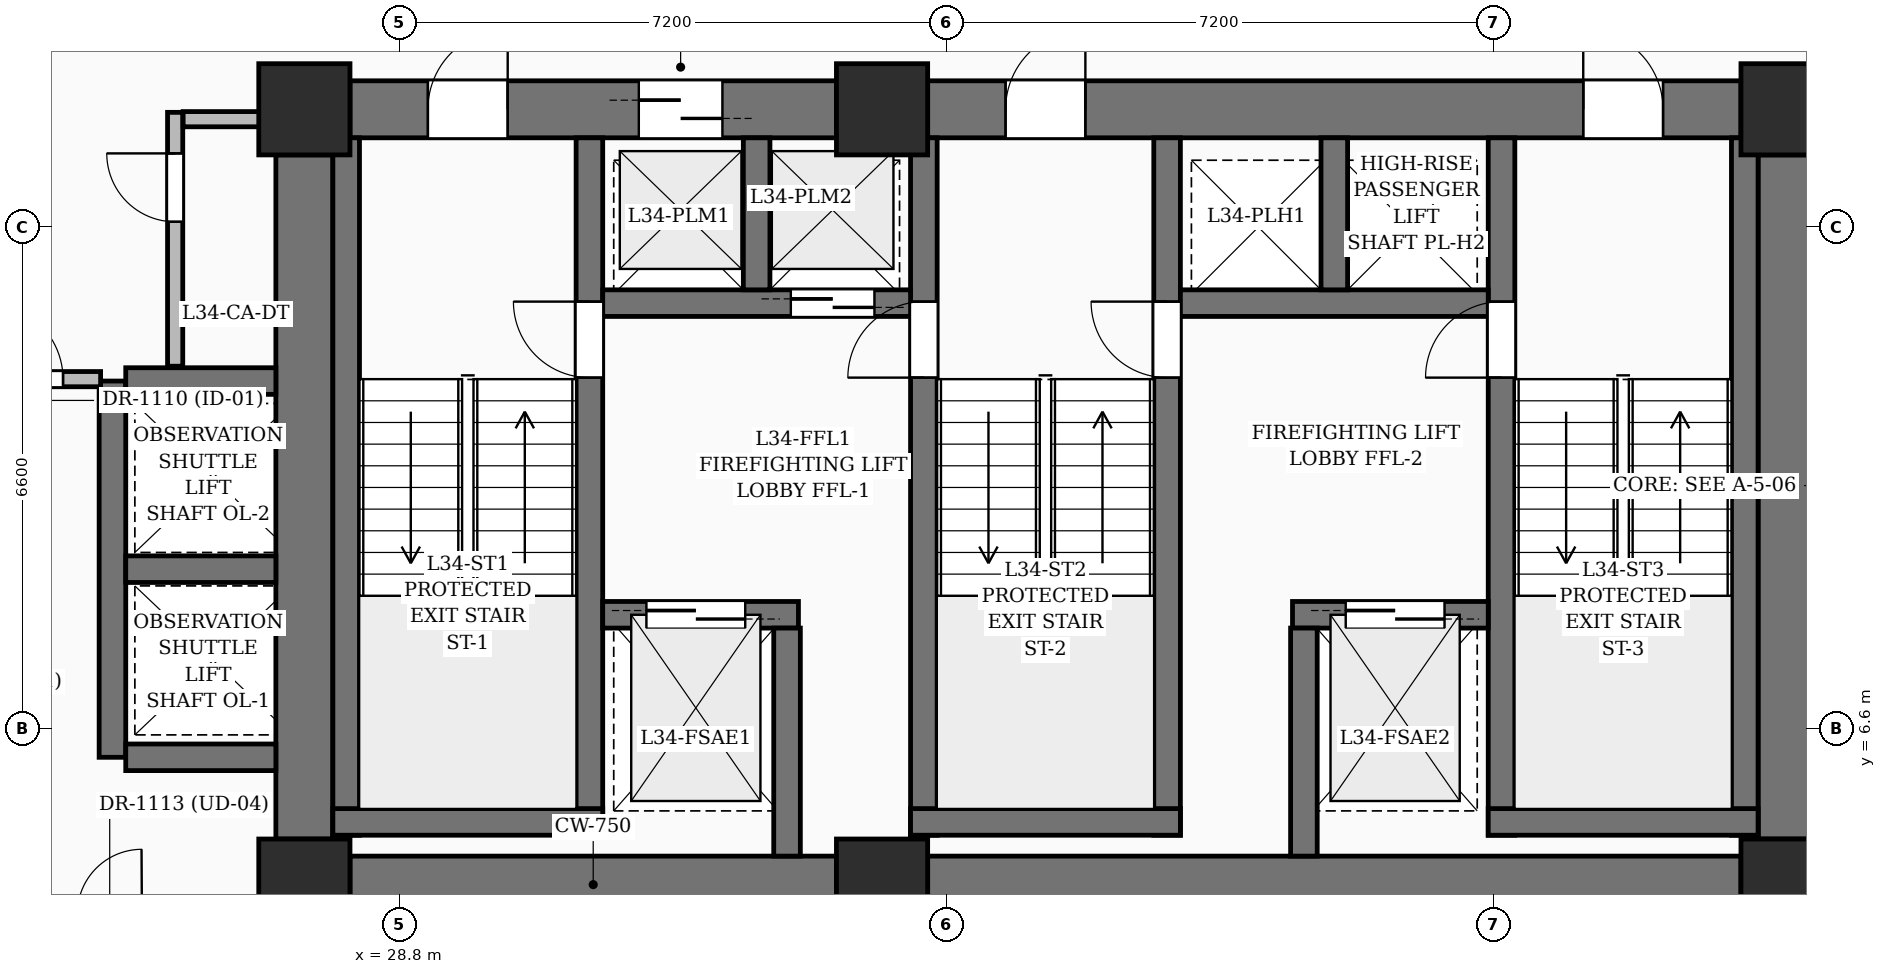
"""IFC4 building model, lengths in metres.
Left out: names, types, materials, properties, quantities, classifications, styles, units other than length and angle.
Written with IfcOpenShell. Run it as: python <this file> out.ifc"""

import sys

from ifc_helpers import new_model, si_unit, direction, frame, frame_2d, origin, origin_2d, place, context, subcontext, project, spatial, rectangle, extrude, element, fill, save


model = new_model("IFC4")
c1 = context("Model", 3, precision=1e-05, world=origin(), true_north=direction((0.0, 1.0)))
c2 = subcontext(c1, "Body", "Model", "MODEL_VIEW")
j1 = project(units=[si_unit("LENGTHUNIT", "METRE"), si_unit("PLANEANGLEUNIT", "RADIAN")], contexts=[c1])
p1 = place(None, origin())
s1 = spatial("IfcSite", under=j1, at=p1, CompositionType="ELEMENT")
p2 = place(p1, origin())
s2 = spatial("IfcBuilding", under=s1, at=p2, CompositionType="ELEMENT")
p3 = place(p2, frame((0.0, 0.0, 135.6)))
s3 = spatial("IfcBuildingStorey", under=s2, at=p3, CompositionType="ELEMENT", Elevation=135.6)
for number, where, z_axis, x_axis in (
    (1, (27.55, 4.55, 0.0), (0.0, 0.0, 1.0), (1.0, 0.0, 0.0)),
    (2, (35.15, 4.55, 0.0), (0.0, 0.0, 1.0), (1.0, 0.0, 0.0)),
    (3, (47.05, 4.55, 0.0), (0.0, 0.0, 1.0), (1.0, 0.0, 0.0)),
    (4, (27.55, 14.75, 0.0), (0.0, 0.0, 1.0), (1.0, 0.0, 0.0)),
    (5, (35.15, 14.75, 0.0), (0.0, 0.0, 1.0), (1.0, 0.0, 0.0)),
    (6, (47.05, 14.75, 0.0), (0.0, 0.0, 1.0), (1.0, 0.0, 0.0)),
):
    element("IfcColumn", number, at=place(p3, frame(where, z_axis=z_axis, x_axis=x_axis)), inside=s3, PredefinedType="COLUMN", context=c2, shape_type="SweptSolid", body=[
        extrude(rectangle(XDim=1.2, YDim=1.2, at=origin_2d()), origin(), (0.0, 0.0, 1.0), 3.6),
    ])
p4 = place(p3, frame((28.15, 4.55, 0.0), z_axis=(0.0, 0.0, 1.0), x_axis=(1.0, 0.0, 0.0)))
e7 = element("IfcWall", 7, at=p4, inside=s3, PredefinedType="SHEAR", context=c2, shape_type="SweptSolid", body=[
    extrude(rectangle(XDim=6.4, YDim=0.75, at=frame_2d((3.2, 0.0))), origin(), (0.0, 0.0, 1.0), 3.6),
])
p5 = place(p3, frame((35.75, 4.55, 0.0), z_axis=(0.0, 0.0, 1.0), x_axis=(1.0, 0.0, 0.0)))
e8 = element("IfcWall", 8, at=p5, inside=s3, PredefinedType="SHEAR", context=c2, shape_type="SweptSolid", body=[
    extrude(rectangle(XDim=10.7, YDim=0.75, at=frame_2d((5.35, 0.0))), origin(), (0.0, 0.0, 1.0), 3.6),
])
p6 = place(p3, frame((28.15, 14.75, 0.0), z_axis=(0.0, 0.0, 1.0), x_axis=(1.0, 0.0, 0.0)))
e9 = element("IfcWall", 9, at=p6, inside=s3, PredefinedType="SHEAR", context=c2, shape_type="SweptSolid", body=[
    extrude(rectangle(XDim=6.4, YDim=0.75, at=frame_2d((3.2, 0.0))), origin(), (0.0, 0.0, 1.0), 3.6),
])
p7 = place(p6, frame((1.025, 0.0, 0.0)))
e10 = element("IfcOpeningElement", 10, at=p7, cuts=e9, PredefinedType="OPENING", context=c2, shape_type="SweptSolid", body=[
    extrude(rectangle(XDim=1.05, YDim=2.15, at=frame_2d((0.525, 1.075))), frame((0.0, 0.385, 0.0), z_axis=(0.0, -1.0, 0.0), x_axis=(1.0, 0.0, 0.0)), (0.0, 0.0, 1.0), 0.77),
])
p8 = place(p6, frame((3.8, 0.0, 0.0)))
e11 = element("IfcOpeningElement", 11, at=p8, cuts=e9, PredefinedType="OPENING", context=c2, shape_type="SweptSolid", body=[
    extrude(rectangle(XDim=1.1, YDim=2.2, at=frame_2d((0.55, 1.1))), frame((0.0, 0.385, 0.0), z_axis=(0.0, -1.0, 0.0), x_axis=(1.0, 0.0, 0.0)), (0.0, 0.0, 1.0), 0.77),
])
p9 = place(p3, frame((35.75, 14.75, 0.0), z_axis=(0.0, 0.0, 1.0), x_axis=(1.0, 0.0, 0.0)))
e12 = element("IfcWall", 12, at=p9, inside=s3, PredefinedType="SHEAR", context=c2, shape_type="SweptSolid", body=[
    extrude(rectangle(XDim=10.7, YDim=0.75, at=frame_2d((5.35, 0.0))), origin(), (0.0, 0.0, 1.0), 3.6),
])
p10 = place(p9, frame((1.025, 0.0, 0.0)))
e13 = element("IfcOpeningElement", 13, at=p10, cuts=e12, PredefinedType="OPENING", context=c2, shape_type="SweptSolid", body=[
    extrude(rectangle(XDim=1.05, YDim=2.15, at=frame_2d((0.525, 1.075))), frame((0.0, 0.385, 0.0), z_axis=(0.0, -1.0, 0.0), x_axis=(1.0, 0.0, 0.0)), (0.0, 0.0, 1.0), 0.77),
])
p11 = place(p9, frame((8.625, 0.0, 0.0)))
e14 = element("IfcOpeningElement", 14, at=p11, cuts=e12, PredefinedType="OPENING", context=c2, shape_type="SweptSolid", body=[
    extrude(rectangle(XDim=1.05, YDim=2.15, at=frame_2d((0.525, 1.075))), frame((0.0, 0.385, 0.0), z_axis=(0.0, -1.0, 0.0), x_axis=(1.0, 0.0, 0.0)), (0.0, 0.0, 1.0), 0.77),
])
for number, where, z_axis, x_axis in (
    (15, (27.55, 5.15, 0.0), (0.0, 0.0, 1.0), (0.0, 1.0, 0.0)),
    (16, (47.05, 5.15, 0.0), (0.0, 0.0, 1.0), (0.0, 1.0, 0.0)),
):
    element("IfcWall", number, at=place(p3, frame(where, z_axis=z_axis, x_axis=x_axis)), inside=s3, PredefinedType="SHEAR", context=c2, shape_type="SweptSolid", body=[
        extrude(rectangle(XDim=9.0, YDim=0.75, at=frame_2d((4.5, 0.0))), origin(), (0.0, 0.0, 1.0), 3.6),
    ])
p12 = place(p3, frame((28.1, 5.2, 0.0), z_axis=(0.0, 0.0, 1.0), x_axis=(0.0, 1.0, 0.0)))
e17 = element("IfcWall", 17, at=p12, inside=s3, PredefinedType="SOLIDWALL", context=c2, shape_type="SweptSolid", body=[
    extrude(rectangle(XDim=9.175, YDim=0.35, at=frame_2d((4.587, 0.0))), origin(), (0.0, 0.0, 1.0), 3.6),
])
p13 = place(p3, frame((31.3, 5.2, 0.0), z_axis=(0.0, 0.0, 1.0), x_axis=(0.0, 1.0, 0.0)))
e18 = element("IfcWall", 18, at=p13, inside=s3, PredefinedType="SOLIDWALL", context=c2, shape_type="SweptSolid", body=[
    extrude(rectangle(XDim=9.175, YDim=0.35, at=frame_2d((4.587, 0.0))), origin(), (0.0, 0.0, 1.0), 3.6),
])
p14 = place(p13, frame((6.02, 0.0, 0.0)))
e19 = element("IfcOpeningElement", 19, at=p14, cuts=e18, PredefinedType="OPENING", context=c2, shape_type="SweptSolid", body=[
    extrude(rectangle(XDim=1.0, YDim=2.15, at=frame_2d((0.5, 1.075))), frame((0.0, 0.185, 0.0), z_axis=(0.0, -1.0, 0.0), x_axis=(1.0, 0.0, 0.0)), (0.0, 0.0, 1.0), 0.37),
])
p15 = place(p3, frame((27.925, 5.375, 0.0), z_axis=(0.0, 0.0, 1.0), x_axis=(1.0, 0.0, 0.0)))
e20 = element("IfcWall", 20, at=p15, inside=s3, PredefinedType="SOLIDWALL", context=c2, shape_type="SweptSolid", body=[
    extrude(rectangle(XDim=3.55, YDim=0.35, at=frame_2d((1.775, 0.0))), origin(), (0.0, 0.0, 1.0), 3.6),
])
p16 = place(p3, frame((35.7, 5.2, 0.0), z_axis=(0.0, 0.0, 1.0), x_axis=(0.0, 1.0, 0.0)))
e21 = element("IfcWall", 21, at=p16, inside=s3, PredefinedType="SOLIDWALL", context=c2, shape_type="SweptSolid", body=[
    extrude(rectangle(XDim=9.175, YDim=0.35, at=frame_2d((4.587, 0.0))), origin(), (0.0, 0.0, 1.0), 3.6),
])
p17 = place(p16, frame((6.02, 0.0, 0.0)))
e22 = element("IfcOpeningElement", 22, at=p17, cuts=e21, PredefinedType="OPENING", context=c2, shape_type="SweptSolid", body=[
    extrude(rectangle(XDim=1.0, YDim=2.15, at=frame_2d((0.5, 1.075))), frame((0.0, 0.185, 0.0), z_axis=(0.0, -1.0, 0.0), x_axis=(1.0, 0.0, 0.0)), (0.0, 0.0, 1.0), 0.37),
])
p18 = place(p3, frame((38.9, 5.2, 0.0), z_axis=(0.0, 0.0, 1.0), x_axis=(0.0, 1.0, 0.0)))
e23 = element("IfcWall", 23, at=p18, inside=s3, PredefinedType="SOLIDWALL", context=c2, shape_type="SweptSolid", body=[
    extrude(rectangle(XDim=9.175, YDim=0.35, at=frame_2d((4.587, 0.0))), origin(), (0.0, 0.0, 1.0), 3.6),
])
p19 = place(p18, frame((6.02, 0.0, 0.0)))
e24 = element("IfcOpeningElement", 24, at=p19, cuts=e23, PredefinedType="OPENING", context=c2, shape_type="SweptSolid", body=[
    extrude(rectangle(XDim=1.0, YDim=2.15, at=frame_2d((0.5, 1.075))), frame((0.0, 0.185, 0.0), z_axis=(0.0, -1.0, 0.0), x_axis=(1.0, 0.0, 0.0)), (0.0, 0.0, 1.0), 0.37),
])
p20 = place(p3, frame((35.525, 5.375, 0.0), z_axis=(0.0, 0.0, 1.0), x_axis=(1.0, 0.0, 0.0)))
e25 = element("IfcWall", 25, at=p20, inside=s3, PredefinedType="SOLIDWALL", context=c2, shape_type="SweptSolid", body=[
    extrude(rectangle(XDim=3.55, YDim=0.35, at=frame_2d((1.775, 0.0))), origin(), (0.0, 0.0, 1.0), 3.6),
])
p21 = place(p3, frame((43.3, 5.2, 0.0), z_axis=(0.0, 0.0, 1.0), x_axis=(0.0, 1.0, 0.0)))
e26 = element("IfcWall", 26, at=p21, inside=s3, PredefinedType="SOLIDWALL", context=c2, shape_type="SweptSolid", body=[
    extrude(rectangle(XDim=9.175, YDim=0.35, at=frame_2d((4.587, 0.0))), origin(), (0.0, 0.0, 1.0), 3.6),
])
p22 = place(p21, frame((6.02, 0.0, 0.0)))
e27 = element("IfcOpeningElement", 27, at=p22, cuts=e26, PredefinedType="OPENING", context=c2, shape_type="SweptSolid", body=[
    extrude(rectangle(XDim=1.0, YDim=2.15, at=frame_2d((0.5, 1.075))), frame((0.0, 0.185, 0.0), z_axis=(0.0, -1.0, 0.0), x_axis=(1.0, 0.0, 0.0)), (0.0, 0.0, 1.0), 0.37),
])
p23 = place(p3, frame((46.5, 5.2, 0.0), z_axis=(0.0, 0.0, 1.0), x_axis=(0.0, 1.0, 0.0)))
e28 = element("IfcWall", 28, at=p23, inside=s3, PredefinedType="SOLIDWALL", context=c2, shape_type="SweptSolid", body=[
    extrude(rectangle(XDim=9.175, YDim=0.35, at=frame_2d((4.587, 0.0))), origin(), (0.0, 0.0, 1.0), 3.6),
])
p24 = place(p3, frame((43.125, 5.375, 0.0), z_axis=(0.0, 0.0, 1.0), x_axis=(1.0, 0.0, 0.0)))
e29 = element("IfcWall", 29, at=p24, inside=s3, PredefinedType="SOLIDWALL", context=c2, shape_type="SweptSolid", body=[
    extrude(rectangle(XDim=3.55, YDim=0.35, at=frame_2d((1.775, 0.0))), origin(), (0.0, 0.0, 1.0), 3.6),
])
p25 = place(p3, frame((31.475, 8.1, 0.0), z_axis=(0.0, 0.0, 1.0), x_axis=(1.0, 0.0, 0.0)))
e30 = element("IfcWall", 30, at=p25, inside=s3, PredefinedType="SOLIDWALL", context=c2, shape_type="SweptSolid", body=[
    extrude(rectangle(XDim=2.575, YDim=0.35, at=frame_2d((1.288, 0.0))), origin(), (0.0, 0.0, 1.0), 3.6),
])
p26 = place(p25, frame((0.575, 0.0, 0.0)))
e31 = element("IfcOpeningElement", 31, at=p26, cuts=e30, PredefinedType="OPENING", context=c2, shape_type="SweptSolid", body=[
    extrude(rectangle(XDim=1.3, YDim=2.25, at=frame_2d((0.65, 1.125))), frame((0.0, 0.185, 0.0), z_axis=(0.0, -1.0, 0.0), x_axis=(1.0, 0.0, 0.0)), (0.0, 0.0, 1.0), 0.37),
])
p27 = place(p3, frame((40.55, 8.1, 0.0), z_axis=(0.0, 0.0, 1.0), x_axis=(1.0, 0.0, 0.0)))
e32 = element("IfcWall", 32, at=p27, inside=s3, PredefinedType="SOLIDWALL", context=c2, shape_type="SweptSolid", body=[
    extrude(rectangle(XDim=2.575, YDim=0.35, at=frame_2d((1.288, 0.0))), origin(), (0.0, 0.0, 1.0), 3.6),
])
p28 = place(p27, frame((0.7, 0.0, 0.0)))
e33 = element("IfcOpeningElement", 33, at=p28, cuts=e32, PredefinedType="OPENING", context=c2, shape_type="SweptSolid", body=[
    extrude(rectangle(XDim=1.3, YDim=2.25, at=frame_2d((0.65, 1.125))), frame((0.0, 0.185, 0.0), z_axis=(0.0, -1.0, 0.0), x_axis=(1.0, 0.0, 0.0)), (0.0, 0.0, 1.0), 0.37),
])
for number, where, z_axis, x_axis in (
    (34, (33.9, 4.925, 0.0), (0.0, 0.0, 1.0), (0.0, 1.0, 0.0)),
    (35, (40.7, 4.925, 0.0), (0.0, 0.0, 1.0), (0.0, 1.0, 0.0)),
):
    element("IfcWall", number, at=place(p3, frame(where, z_axis=z_axis, x_axis=x_axis)), inside=s3, PredefinedType="SOLIDWALL", context=c2, shape_type="SweptSolid", body=[
        extrude(rectangle(XDim=3.0, YDim=0.35, at=frame_2d((1.5, 0.0))), origin(), (0.0, 0.0, 1.0), 3.6),
    ])
p29 = place(p3, frame((31.475, 12.2, 0.0), z_axis=(0.0, 0.0, 1.0), x_axis=(1.0, 0.0, 0.0)))
e36 = element("IfcWall", 36, at=p29, inside=s3, PredefinedType="SOLIDWALL", context=c2, shape_type="SweptSolid", body=[
    extrude(rectangle(XDim=4.05, YDim=0.35, at=frame_2d((2.025, 0.0))), origin(), (0.0, 0.0, 1.0), 3.6),
])
p30 = place(p29, frame((2.475, 0.0, 0.0)))
e37 = element("IfcOpeningElement", 37, at=p30, cuts=e36, PredefinedType="OPENING", context=c2, shape_type="SweptSolid", body=[
    extrude(rectangle(XDim=1.1, YDim=2.2, at=frame_2d((0.55, 1.1))), frame((0.0, 0.185, 0.0), z_axis=(0.0, -1.0, 0.0), x_axis=(1.0, 0.0, 0.0)), (0.0, 0.0, 1.0), 0.37),
])
p31 = place(p3, frame((33.5, 12.375, 0.0), z_axis=(0.0, 0.0, 1.0), x_axis=(0.0, 1.0, 0.0)))
e38 = element("IfcWall", 38, at=p31, inside=s3, PredefinedType="SOLIDWALL", context=c2, shape_type="SweptSolid", body=[
    extrude(rectangle(XDim=2.0, YDim=0.35, at=frame_2d((1.0, 0.0))), origin(), (0.0, 0.0, 1.0), 3.6),
])
p32 = place(p3, frame((39.075, 12.2, 0.0), z_axis=(0.0, 0.0, 1.0), x_axis=(1.0, 0.0, 0.0)))
e39 = element("IfcWall", 39, at=p32, inside=s3, PredefinedType="SOLIDWALL", context=c2, shape_type="SweptSolid", body=[
    extrude(rectangle(XDim=4.05, YDim=0.35, at=frame_2d((2.025, 0.0))), origin(), (0.0, 0.0, 1.0), 3.6),
])
p33 = place(p3, frame((41.1, 12.375, 0.0), z_axis=(0.0, 0.0, 1.0), x_axis=(0.0, 1.0, 0.0)))
e40 = element("IfcWall", 40, at=p33, inside=s3, PredefinedType="SOLIDWALL", context=c2, shape_type="SweptSolid", body=[
    extrude(rectangle(XDim=2.0, YDim=0.35, at=frame_2d((1.0, 0.0))), origin(), (0.0, 0.0, 1.0), 3.6),
])
p34 = place(p3, frame((25.025, 6.225, 0.0), z_axis=(0.0, 0.0, 1.0), x_axis=(0.0, 1.0, 0.0)))
e41 = element("IfcWall", 41, at=p34, inside=s3, PredefinedType="SOLIDWALL", context=c2, shape_type="SweptSolid", body=[
    extrude(rectangle(XDim=4.95, YDim=0.35, at=frame_2d((2.475, 0.0))), origin(), (0.0, 0.0, 1.0), 3.6),
])
for number, where, z_axis, x_axis in (
    (42, (25.2, 6.225, 0.0), (0.0, 0.0, 1.0), (1.0, 0.0, 0.0)),
    (43, (25.2, 8.7, 0.0), (0.0, 0.0, 1.0), (1.0, 0.0, 0.0)),
    (44, (25.2, 11.175, 0.0), (0.0, 0.0, 1.0), (1.0, 0.0, 0.0)),
):
    element("IfcWall", number, at=place(p3, frame(where, z_axis=z_axis, x_axis=x_axis)), inside=s3, PredefinedType="SOLIDWALL", context=c2, shape_type="SweptSolid", body=[
        extrude(rectangle(XDim=1.975, YDim=0.35, at=frame_2d((0.988, 0.0))), origin(), (0.0, 0.0, 1.0), 3.6),
    ])
p35 = place(p3, frame((25.85, 11.37, 0.0), z_axis=(0.0, 0.0, 1.0), x_axis=(0.0, 1.0, 0.0)))
e45 = element("IfcWall", 45, at=p35, inside=s3, PredefinedType="PARTITIONING", context=c2, shape_type="SweptSolid", body=[
    extrude(rectangle(XDim=3.34, YDim=0.2, at=frame_2d((1.67, 0.0))), origin(), (0.0, 0.0, 1.0), 3.35),
])
p36 = place(p35, frame((1.9, 0.0, 0.0)))
e46 = element("IfcOpeningElement", 46, at=p36, cuts=e45, PredefinedType="OPENING", context=c2, shape_type="SweptSolid", body=[
    extrude(rectangle(XDim=0.9, YDim=2.1, at=frame_2d((0.45, 1.05))), frame((0.0, 0.11, 0.0), z_axis=(0.0, -1.0, 0.0), x_axis=(1.0, 0.0, 0.0)), (0.0, 0.0, 1.0), 0.22),
])
p37 = place(p3, frame((25.955, 14.62, 0.0), z_axis=(0.0, 0.0, 1.0), x_axis=(1.0, 0.0, 0.0)))
e47 = element("IfcWall", 47, at=p37, inside=s3, PredefinedType="PARTITIONING", context=c2, shape_type="SweptSolid", body=[
    extrude(rectangle(XDim=1.205, YDim=0.2, at=frame_2d((0.603, 0.0))), origin(), (0.0, 0.0, 1.0), 3.35),
])
p38 = place(p3, frame((22.8, 11.2, 0.0), z_axis=(0.0, 0.0, 1.0), x_axis=(1.0, 0.0, 0.0)))
e48 = element("IfcWall", 48, at=p38, inside=s3, PredefinedType="PARTITIONING", context=c2, shape_type="SweptSolid", body=[
    extrude(rectangle(XDim=2.069, YDim=0.2, at=frame_2d((1.035, 0.0))), origin(), (0.0, 0.0, 1.0), 3.35),
])
p39 = place(p38, frame((0.575, 0.0, 0.0)))
e49 = element("IfcOpeningElement", 49, at=p39, cuts=e48, PredefinedType="OPENING", context=c2, shape_type="SweptSolid", body=[
    extrude(rectangle(XDim=1.0, YDim=2.2, at=frame_2d((0.5, 1.1))), frame((0.0, 0.11, 0.0), z_axis=(0.0, -1.0, 0.0), x_axis=(1.0, 0.0, 0.0)), (0.0, 0.0, 1.0), 0.22),
])
p40 = place(p7, origin())
e50 = element("IfcDoor", 50, at=p40, inside=s3, OperationType="SINGLE_SWING_RIGHT", PredefinedType="DOOR", context=c2, shape_type="SweptSolid", body=[
    extrude(rectangle(XDim=1.05, YDim=2.15, at=frame_2d((0.525, 1.075))), frame((0.0, 0.025, 0.0), z_axis=(0.0, -1.0, 0.0), x_axis=(1.0, 0.0, 0.0)), (0.0, 0.0, 1.0), 0.05),
])
fill(e10, e50)
p41 = place(p10, origin())
e51 = element("IfcDoor", 51, at=p41, inside=s3, OperationType="SINGLE_SWING_RIGHT", PredefinedType="DOOR", context=c2, shape_type="SweptSolid", body=[
    extrude(rectangle(XDim=1.05, YDim=2.15, at=frame_2d((0.525, 1.075))), frame((0.0, 0.025, 0.0), z_axis=(0.0, -1.0, 0.0), x_axis=(1.0, 0.0, 0.0)), (0.0, 0.0, 1.0), 0.05),
])
fill(e13, e51)
p42 = place(p11, origin())
e52 = element("IfcDoor", 52, at=p42, inside=s3, OperationType="SINGLE_SWING_LEFT", PredefinedType="DOOR", context=c2, shape_type="SweptSolid", body=[
    extrude(rectangle(XDim=1.05, YDim=2.15, at=frame_2d((0.525, 1.075))), frame((0.0, 0.025, 0.0), z_axis=(0.0, -1.0, 0.0), x_axis=(1.0, 0.0, 0.0)), (0.0, 0.0, 1.0), 0.05),
])
fill(e14, e52)
p43 = place(p14, origin())
e53 = element("IfcDoor", 53, at=p43, inside=s3, OperationType="SINGLE_SWING_RIGHT", PredefinedType="DOOR", context=c2, shape_type="SweptSolid", body=[
    extrude(rectangle(XDim=1.0, YDim=2.15, at=frame_2d((0.5, 1.075))), frame((0.0, 0.025, 0.0), z_axis=(0.0, -1.0, 0.0), x_axis=(1.0, 0.0, 0.0)), (0.0, 0.0, 1.0), 0.05),
])
fill(e19, e53)
p44 = place(p17, origin())
e54 = element("IfcDoor", 54, at=p44, inside=s3, OperationType="SINGLE_SWING_LEFT", PredefinedType="DOOR", context=c2, shape_type="SweptSolid", body=[
    extrude(rectangle(XDim=1.0, YDim=2.15, at=frame_2d((0.5, 1.075))), frame((0.0, 0.025, 0.0), z_axis=(0.0, -1.0, 0.0), x_axis=(1.0, 0.0, 0.0)), (0.0, 0.0, 1.0), 0.05),
])
fill(e22, e54)
p45 = place(p19, origin())
e55 = element("IfcDoor", 55, at=p45, inside=s3, OperationType="SINGLE_SWING_RIGHT", PredefinedType="DOOR", context=c2, shape_type="SweptSolid", body=[
    extrude(rectangle(XDim=1.0, YDim=2.15, at=frame_2d((0.5, 1.075))), frame((0.0, 0.025, 0.0), z_axis=(0.0, -1.0, 0.0), x_axis=(1.0, 0.0, 0.0)), (0.0, 0.0, 1.0), 0.05),
])
fill(e24, e55)
p46 = place(p22, origin())
e56 = element("IfcDoor", 56, at=p46, inside=s3, OperationType="SINGLE_SWING_LEFT", PredefinedType="DOOR", context=c2, shape_type="SweptSolid", body=[
    extrude(rectangle(XDim=1.0, YDim=2.15, at=frame_2d((0.5, 1.075))), frame((0.0, 0.025, 0.0), z_axis=(0.0, -1.0, 0.0), x_axis=(1.0, 0.0, 0.0)), (0.0, 0.0, 1.0), 0.05),
])
fill(e27, e56)
p47 = place(p26, origin())
e57 = element("IfcDoor", 57, at=p47, inside=s3, OperationType="DOUBLE_DOOR_SLIDING", PredefinedType="DOOR", context=c2, shape_type="SweptSolid", body=[
    extrude(rectangle(XDim=1.3, YDim=2.25, at=frame_2d((0.65, 1.125))), frame((0.0, 0.025, 0.0), z_axis=(0.0, -1.0, 0.0), x_axis=(1.0, 0.0, 0.0)), (0.0, 0.0, 1.0), 0.05),
])
fill(e31, e57)
p48 = place(p28, origin())
e58 = element("IfcDoor", 58, at=p48, inside=s3, OperationType="DOUBLE_DOOR_SLIDING", PredefinedType="DOOR", context=c2, shape_type="SweptSolid", body=[
    extrude(rectangle(XDim=1.3, YDim=2.25, at=frame_2d((0.65, 1.125))), frame((0.0, 0.025, 0.0), z_axis=(0.0, -1.0, 0.0), x_axis=(1.0, 0.0, 0.0)), (0.0, 0.0, 1.0), 0.05),
])
fill(e33, e58)
p49 = place(p8, origin())
e59 = element("IfcDoor", 59, at=p49, inside=s3, OperationType="DOUBLE_DOOR_SLIDING", PredefinedType="DOOR", context=c2, shape_type="SweptSolid", body=[
    extrude(rectangle(XDim=1.1, YDim=2.2, at=frame_2d((0.55, 1.1))), frame((0.0, 0.025, 0.0), z_axis=(0.0, -1.0, 0.0), x_axis=(1.0, 0.0, 0.0)), (0.0, 0.0, 1.0), 0.05),
])
fill(e11, e59)
p50 = place(p30, origin())
e60 = element("IfcDoor", 60, at=p50, inside=s3, OperationType="DOUBLE_DOOR_SLIDING", PredefinedType="DOOR", context=c2, shape_type="SweptSolid", body=[
    extrude(rectangle(XDim=1.1, YDim=2.2, at=frame_2d((0.55, 1.1))), frame((0.0, 0.025, 0.0), z_axis=(0.0, -1.0, 0.0), x_axis=(1.0, 0.0, 0.0)), (0.0, 0.0, 1.0), 0.05),
])
fill(e37, e60)
p51 = place(p36, origin())
e61 = element("IfcDoor", 61, at=p51, inside=s3, OperationType="SINGLE_SWING_RIGHT", PredefinedType="DOOR", context=c2, shape_type="SweptSolid", body=[
    extrude(rectangle(XDim=0.9, YDim=2.1, at=frame_2d((0.45, 1.05))), frame((0.0, 0.025, 0.0), z_axis=(0.0, -1.0, 0.0), x_axis=(1.0, 0.0, 0.0)), (0.0, 0.0, 1.0), 0.05),
])
fill(e46, e61)
p52 = place(p39, origin())
e62 = element("IfcDoor", 62, at=p52, inside=s3, OperationType="SINGLE_SWING_LEFT", PredefinedType="DOOR", context=c2, shape_type="SweptSolid", body=[
    extrude(rectangle(XDim=1.0, YDim=2.2, at=frame_2d((0.5, 1.1))), frame((0.0, 0.025, 0.0), z_axis=(0.0, -1.0, 0.0), x_axis=(1.0, 0.0, 0.0)), (0.0, 0.0, 1.0), 0.05),
])
fill(e49, e62)
save(model, sys.argv[1])
